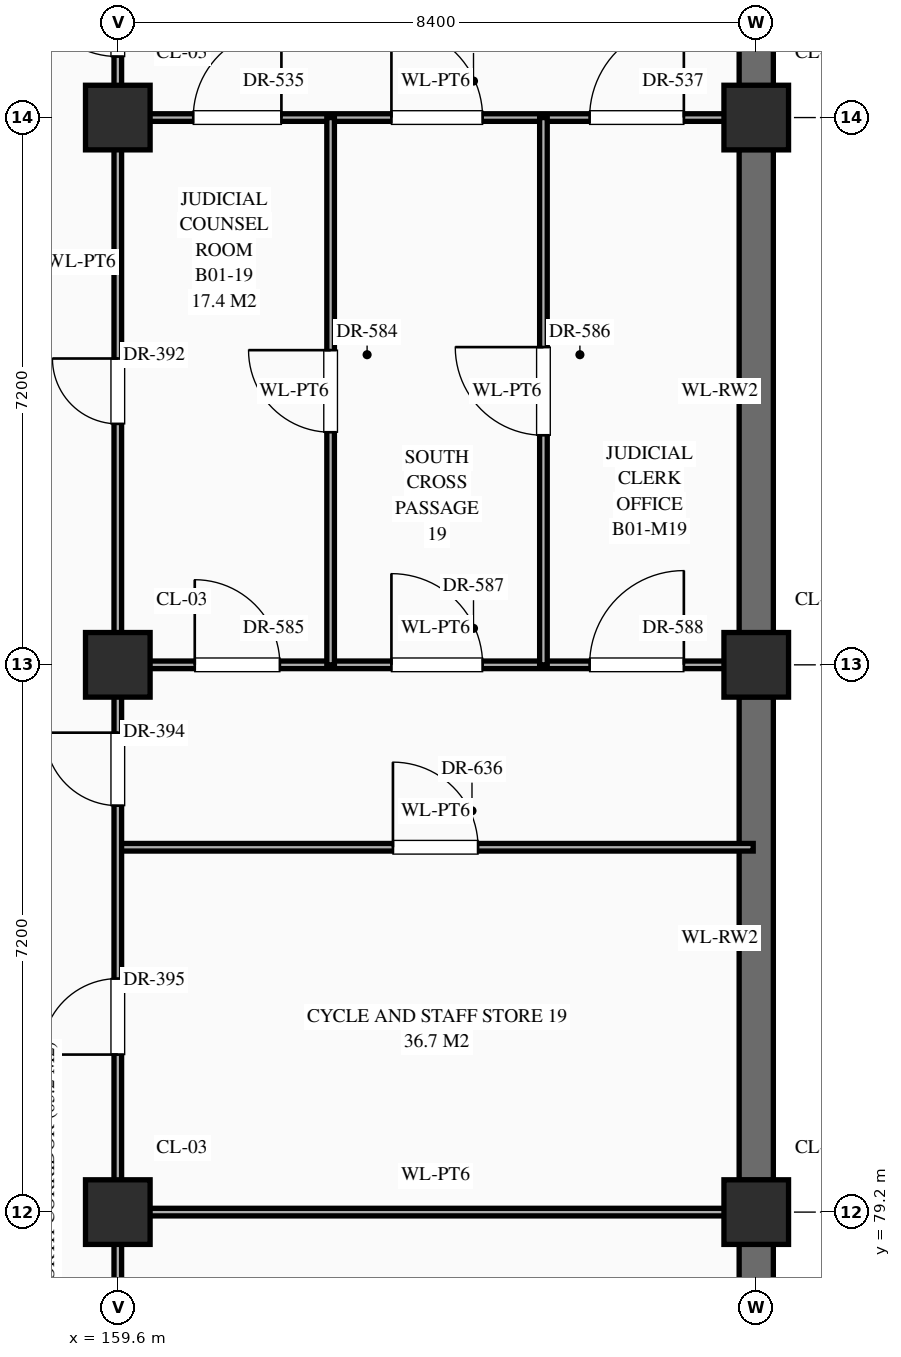
"""IFC4 building model, lengths in metres.
Left out: names, types, materials, properties, quantities, classifications, styles, units other than length and angle.
Written with IfcOpenShell. Run it as: python <this file> out.ifc"""

import sys

from ifc_helpers import new_model, si_unit, direction, frame, frame_2d, origin, origin_2d, place, context, subcontext, project, spatial, rectangle, extrude, element, fill, save


model = new_model("IFC4")
c1 = context("Model", 3, precision=1e-05, world=origin(), true_north=direction((0.0, 1.0)))
c2 = subcontext(c1, "Body", "Model", "MODEL_VIEW")
j1 = project(units=[si_unit("LENGTHUNIT", "METRE"), si_unit("PLANEANGLEUNIT", "RADIAN")], contexts=[c1])
p1 = place(None, origin())
s1 = spatial("IfcSite", under=j1, at=p1, CompositionType="ELEMENT")
p2 = place(p1, origin())
s2 = spatial("IfcBuilding", under=s1, at=p2, CompositionType="ELEMENT")
p3 = place(p2, frame((0.0, 0.0, -5.4)))
s3 = spatial("IfcBuildingStorey", under=s2, at=p3, CompositionType="ELEMENT", Elevation=-5.4)
for number, where, z_axis, x_axis in (
    (1, (159.6, 79.2, 0.0), (0.0, 0.0, 1.0), (1.0, 0.0, 0.0)),
    (2, (159.6, 86.4, 0.0), (0.0, 0.0, 1.0), (1.0, 0.0, 0.0)),
    (3, (159.6, 93.6, 0.0), (0.0, 0.0, 1.0), (1.0, 0.0, 0.0)),
    (4, (168.0, 79.2, 0.0), (0.0, 0.0, 1.0), (1.0, 0.0, 0.0)),
    (5, (168.0, 86.4, 0.0), (0.0, 0.0, 1.0), (1.0, 0.0, 0.0)),
    (6, (168.0, 93.6, 0.0), (0.0, 0.0, 1.0), (1.0, 0.0, 0.0)),
):
    element("IfcColumn", number, at=place(p3, frame(where, z_axis=z_axis, x_axis=x_axis)), inside=s3, PredefinedType="COLUMN", context=c2, shape_type="SweptSolid", body=[
        extrude(rectangle(XDim=0.85, YDim=0.85, at=origin_2d()), origin(), (0.0, 0.0, 1.0), 5.4),
    ])
p4 = place(p3, frame((168.0, 72.42, 0.0), z_axis=(0.0, 0.0, 1.0), x_axis=(0.0, 1.0, 0.0)))
e7 = element("IfcWall", 7, at=p4, inside=s3, PredefinedType="USERDEFINED", context=c2, shape_type="SweptSolid", body=[
    extrude(rectangle(XDim=6.36, YDim=0.45, at=frame_2d((3.18, 0.0))), origin(), (0.0, 0.0, 1.0), 5.1),
])
for number, where, z_axis, x_axis in (
    (8, (168.0, 79.62, 0.0), (0.0, 0.0, 1.0), (0.0, 1.0, 0.0)),
    (9, (168.0, 86.82, 0.0), (0.0, 0.0, 1.0), (0.0, 1.0, 0.0)),
    (10, (168.0, 94.02, 0.0), (0.0, 0.0, 1.0), (0.0, 1.0, 0.0)),
):
    element("IfcWall", number, at=place(p3, frame(where, z_axis=z_axis, x_axis=x_axis)), inside=s3, PredefinedType="USERDEFINED", context=c2, shape_type="SweptSolid", body=[
        extrude(rectangle(XDim=6.36, YDim=0.45, at=frame_2d((3.18, 0.0))), origin(), (0.0, 0.0, 1.0), 5.1),
    ])
p5 = place(p3, frame((159.6, 79.2, 0.0), z_axis=(0.0, 0.0, 1.0), x_axis=(1.0, 0.0, 0.0)))
e11 = element("IfcWall", 11, at=p5, inside=s3, PredefinedType="STANDARD", context=c2, shape_type="SweptSolid", body=[
    extrude(rectangle(XDim=8.36, YDim=0.1, at=frame_2d((4.18, 0.0))), origin(), (0.0, 0.0, 1.0), 4.25),
])
p6 = place(p3, frame((159.6, 84.0, 0.0), z_axis=(0.0, 0.0, 1.0), x_axis=(1.0, 0.0, 0.0)))
e12 = element("IfcWall", 12, at=p6, inside=s3, PredefinedType="STANDARD", context=c2, shape_type="SweptSolid", body=[
    extrude(rectangle(XDim=8.36, YDim=0.1, at=frame_2d((4.18, 0.0))), origin(), (0.0, 0.0, 1.0), 5.1),
])
p7 = place(p6, frame((3.62, 0.0, 0.0)))
e13 = element("IfcOpeningElement", 13, at=p7, cuts=e12, PredefinedType="OPENING", context=c2, shape_type="SweptSolid", body=[
    extrude(rectangle(XDim=1.12, YDim=2.25, at=frame_2d((0.56, 1.125))), frame((0.0, 0.062, 0.0), z_axis=(0.0, -1.0, 0.0), x_axis=(1.0, 0.0, 0.0)), (0.0, 0.0, 1.0), 0.124),
])
p8 = place(p3, frame((159.6, 86.4, 0.0), z_axis=(0.0, 0.0, 1.0), x_axis=(1.0, 0.0, 0.0)))
e14 = element("IfcWall", 14, at=p8, inside=s3, PredefinedType="STANDARD", context=c2, shape_type="SweptSolid", body=[
    extrude(rectangle(XDim=8.36, YDim=0.1, at=frame_2d((4.18, 0.0))), origin(), (0.0, 0.0, 1.0), 4.25),
])
p9 = place(p8, frame((1.012, 0.0, 0.0)))
e15 = element("IfcOpeningElement", 15, at=p9, cuts=e14, PredefinedType="OPENING", context=c2, shape_type="SweptSolid", body=[
    extrude(rectangle(XDim=1.12, YDim=2.25, at=frame_2d((0.56, 1.125))), frame((0.0, 0.062, 0.0), z_axis=(0.0, -1.0, 0.0), x_axis=(1.0, 0.0, 0.0)), (0.0, 0.0, 1.0), 0.124),
])
p10 = place(p8, frame((3.6, 0.0, 0.0)))
e16 = element("IfcOpeningElement", 16, at=p10, cuts=e14, PredefinedType="OPENING", context=c2, shape_type="SweptSolid", body=[
    extrude(rectangle(XDim=1.2, YDim=2.35, at=frame_2d((0.6, 1.175))), frame((0.0, 0.062, 0.0), z_axis=(0.0, -1.0, 0.0), x_axis=(1.0, 0.0, 0.0)), (0.0, 0.0, 1.0), 0.124),
])
p11 = place(p8, frame((6.208, 0.0, 0.0)))
e17 = element("IfcOpeningElement", 17, at=p11, cuts=e14, PredefinedType="OPENING", context=c2, shape_type="SweptSolid", body=[
    extrude(rectangle(XDim=1.24, YDim=2.3, at=frame_2d((0.62, 1.15))), frame((0.0, 0.062, 0.0), z_axis=(0.0, -1.0, 0.0), x_axis=(1.0, 0.0, 0.0)), (0.0, 0.0, 1.0), 0.124),
])
p12 = place(p3, frame((159.6, 93.6, 0.0), z_axis=(0.0, 0.0, 1.0), x_axis=(1.0, 0.0, 0.0)))
e18 = element("IfcWall", 18, at=p12, inside=s3, PredefinedType="STANDARD", context=c2, shape_type="SweptSolid", body=[
    extrude(rectangle(XDim=8.36, YDim=0.1, at=frame_2d((4.18, 0.0))), origin(), (0.0, 0.0, 1.0), 4.25),
])
p13 = place(p12, frame((0.992, 0.0, 0.0)))
e19 = element("IfcOpeningElement", 19, at=p13, cuts=e18, PredefinedType="OPENING", context=c2, shape_type="SweptSolid", body=[
    extrude(rectangle(XDim=1.16, YDim=2.3, at=frame_2d((0.58, 1.15))), frame((0.0, 0.062, 0.0), z_axis=(0.0, -1.0, 0.0), x_axis=(1.0, 0.0, 0.0)), (0.0, 0.0, 1.0), 0.124),
])
p14 = place(p12, frame((3.6, 0.0, 0.0)))
e20 = element("IfcOpeningElement", 20, at=p14, cuts=e18, PredefinedType="OPENING", context=c2, shape_type="SweptSolid", body=[
    extrude(rectangle(XDim=1.2, YDim=2.35, at=frame_2d((0.6, 1.175))), frame((0.0, 0.062, 0.0), z_axis=(0.0, -1.0, 0.0), x_axis=(1.0, 0.0, 0.0)), (0.0, 0.0, 1.0), 0.124),
])
p15 = place(p12, frame((6.208, 0.0, 0.0)))
e21 = element("IfcOpeningElement", 21, at=p15, cuts=e18, PredefinedType="OPENING", context=c2, shape_type="SweptSolid", body=[
    extrude(rectangle(XDim=1.24, YDim=2.3, at=frame_2d((0.62, 1.15))), frame((0.0, 0.062, 0.0), z_axis=(0.0, -1.0, 0.0), x_axis=(1.0, 0.0, 0.0)), (0.0, 0.0, 1.0), 0.124),
])
p16 = place(p3, frame((159.6, 43.2, 0.0), z_axis=(0.0, 0.0, 1.0), x_axis=(0.0, 1.0, 0.0)))
e22 = element("IfcWall", 22, at=p16, inside=s3, PredefinedType="STANDARD", context=c2, shape_type="SweptSolid", body=[
    extrude(rectangle(XDim=64.8, YDim=0.1, at=frame_2d((32.4, 0.0))), origin(), (0.0, 0.0, 1.0), 4.35),
])
p17 = place(p16, frame((58.462, 0.0, 0.0)))
e23 = element("IfcOpeningElement", 23, at=p17, cuts=e22, PredefinedType="OPENING", context=c2, shape_type="SweptSolid", body=[
    extrude(rectangle(XDim=1.02, YDim=2.4, at=frame_2d((0.51, 1.2))), frame((0.0, 0.062, 0.0), z_axis=(0.0, -1.0, 0.0), x_axis=(1.0, 0.0, 0.0)), (0.0, 0.0, 1.0), 0.124),
])
p18 = place(p16, frame((61.698, 0.0, 0.0)))
e24 = element("IfcOpeningElement", 24, at=p18, cuts=e22, PredefinedType="OPENING", context=c2, shape_type="SweptSolid", body=[
    extrude(rectangle(XDim=1.06, YDim=2.4, at=frame_2d((0.53, 1.2))), frame((0.0, 0.062, 0.0), z_axis=(0.0, -1.0, 0.0), x_axis=(1.0, 0.0, 0.0)), (0.0, 0.0, 1.0), 0.124),
])
p19 = place(p16, frame((51.202, 0.0, 0.0)))
e25 = element("IfcOpeningElement", 25, at=p19, cuts=e22, PredefinedType="OPENING", context=c2, shape_type="SweptSolid", body=[
    extrude(rectangle(XDim=1.14, YDim=2.4, at=frame_2d((0.57, 1.2))), frame((0.0, 0.062, 0.0), z_axis=(0.0, -1.0, 0.0), x_axis=(1.0, 0.0, 0.0)), (0.0, 0.0, 1.0), 0.124),
])
p20 = place(p16, frame((54.577, 0.0, 0.0)))
e26 = element("IfcOpeningElement", 26, at=p20, cuts=e22, PredefinedType="OPENING", context=c2, shape_type="SweptSolid", body=[
    extrude(rectangle(XDim=0.9, YDim=2.15, at=frame_2d((0.45, 1.075))), frame((0.0, 0.062, 0.0), z_axis=(0.0, -1.0, 0.0), x_axis=(1.0, 0.0, 0.0)), (0.0, 0.0, 1.0), 0.124),
])
p21 = place(p16, frame((46.37, 0.0, 0.0)))
e27 = element("IfcOpeningElement", 27, at=p21, cuts=e22, PredefinedType="OPENING", context=c2, shape_type="SweptSolid", body=[
    extrude(rectangle(XDim=0.86, YDim=2.1, at=frame_2d((0.43, 1.05))), frame((0.0, 0.062, 0.0), z_axis=(0.0, -1.0, 0.0), x_axis=(1.0, 0.0, 0.0)), (0.0, 0.0, 1.0), 0.124),
])
p22 = place(p16, frame((41.347, 0.0, 0.0)))
e28 = element("IfcOpeningElement", 28, at=p22, cuts=e22, PredefinedType="OPENING", context=c2, shape_type="SweptSolid", body=[
    extrude(rectangle(XDim=0.96, YDim=2.2, at=frame_2d((0.48, 1.1))), frame((0.0, 0.062, 0.0), z_axis=(0.0, -1.0, 0.0), x_axis=(1.0, 0.0, 0.0)), (0.0, 0.0, 1.0), 0.124),
])
p23 = place(p16, frame((38.073, 0.0, 0.0)))
e29 = element("IfcOpeningElement", 29, at=p23, cuts=e22, PredefinedType="OPENING", context=c2, shape_type="SweptSolid", body=[
    extrude(rectangle(XDim=1.0, YDim=2.25, at=frame_2d((0.5, 1.125))), frame((0.0, 0.062, 0.0), z_axis=(0.0, -1.0, 0.0), x_axis=(1.0, 0.0, 0.0)), (0.0, 0.0, 1.0), 0.124),
])
p24 = place(p16, frame((24.66, 0.0, 0.0)))
e30 = element("IfcOpeningElement", 30, at=p24, cuts=e22, PredefinedType="OPENING", context=c2, shape_type="SweptSolid", body=[
    extrude(rectangle(XDim=1.08, YDim=2.25, at=frame_2d((0.54, 1.125))), frame((0.0, 0.062, 0.0), z_axis=(0.0, -1.0, 0.0), x_axis=(1.0, 0.0, 0.0)), (0.0, 0.0, 1.0), 0.124),
])
p25 = place(p16, frame((10.16, 0.0, 0.0)))
e31 = element("IfcOpeningElement", 31, at=p25, cuts=e22, PredefinedType="OPENING", context=c2, shape_type="SweptSolid", body=[
    extrude(rectangle(XDim=1.28, YDim=2.35, at=frame_2d((0.64, 1.175))), frame((0.0, 0.062, 0.0), z_axis=(0.0, -1.0, 0.0), x_axis=(1.0, 0.0, 0.0)), (0.0, 0.0, 1.0), 0.124),
])
p26 = place(p3, frame((162.4, 86.4, 0.0), z_axis=(0.0, 0.0, 1.0), x_axis=(0.0, 1.0, 0.0)))
e32 = element("IfcWall", 32, at=p26, inside=s3, PredefinedType="STANDARD", context=c2, shape_type="SweptSolid", body=[
    extrude(rectangle(XDim=7.2, YDim=0.1, at=frame_2d((3.6, 0.0))), origin(), (0.0, 0.0, 1.0), 5.1),
])
p27 = place(p26, frame((3.06, 0.0, 0.0)))
e33 = element("IfcOpeningElement", 33, at=p27, cuts=e32, PredefinedType="OPENING", context=c2, shape_type="SweptSolid", body=[
    extrude(rectangle(XDim=1.08, YDim=2.25, at=frame_2d((0.54, 1.125))), frame((0.0, 0.062, 0.0), z_axis=(0.0, -1.0, 0.0), x_axis=(1.0, 0.0, 0.0)), (0.0, 0.0, 1.0), 0.124),
])
p28 = place(p3, frame((165.2, 86.4, 0.0), z_axis=(0.0, 0.0, 1.0), x_axis=(0.0, 1.0, 0.0)))
e34 = element("IfcWall", 34, at=p28, inside=s3, PredefinedType="STANDARD", context=c2, shape_type="SweptSolid", body=[
    extrude(rectangle(XDim=7.2, YDim=0.1, at=frame_2d((3.6, 0.0))), origin(), (0.0, 0.0, 1.0), 5.1),
])
p29 = place(p28, frame((3.02, 0.0, 0.0)))
e35 = element("IfcOpeningElement", 35, at=p29, cuts=e34, PredefinedType="OPENING", context=c2, shape_type="SweptSolid", body=[
    extrude(rectangle(XDim=1.16, YDim=2.3, at=frame_2d((0.58, 1.15))), frame((0.0, 0.062, 0.0), z_axis=(0.0, -1.0, 0.0), x_axis=(1.0, 0.0, 0.0)), (0.0, 0.0, 1.0), 0.124),
])
p30 = place(p19, origin())
e36 = element("IfcDoor", 36, at=p30, inside=s3, OperationType="SINGLE_SWING_RIGHT", PredefinedType="DOOR", context=c2, shape_type="SweptSolid", body=[
    extrude(rectangle(XDim=1.14, YDim=2.4, at=frame_2d((0.57, 1.2))), frame((0.0, 0.025, 0.0), z_axis=(0.0, -1.0, 0.0), x_axis=(1.0, 0.0, 0.0)), (0.0, 0.0, 1.0), 0.05),
])
fill(e25, e36)
p31 = place(p21, origin())
e37 = element("IfcDoor", 37, at=p31, inside=s3, OperationType="SINGLE_SWING_RIGHT", PredefinedType="DOOR", context=c2, shape_type="SweptSolid", body=[
    extrude(rectangle(XDim=0.86, YDim=2.1, at=frame_2d((0.43, 1.05))), frame((0.0, 0.025, 0.0), z_axis=(0.0, -1.0, 0.0), x_axis=(1.0, 0.0, 0.0)), (0.0, 0.0, 1.0), 0.05),
])
fill(e27, e37)
p32 = place(p22, origin())
e38 = element("IfcDoor", 38, at=p32, inside=s3, OperationType="SINGLE_SWING_RIGHT", PredefinedType="DOOR", context=c2, shape_type="SweptSolid", body=[
    extrude(rectangle(XDim=0.96, YDim=2.2, at=frame_2d((0.48, 1.1))), frame((0.0, 0.025, 0.0), z_axis=(0.0, -1.0, 0.0), x_axis=(1.0, 0.0, 0.0)), (0.0, 0.0, 1.0), 0.05),
])
fill(e28, e38)
p33 = place(p23, origin())
e39 = element("IfcDoor", 39, at=p33, inside=s3, OperationType="SINGLE_SWING_LEFT", PredefinedType="DOOR", context=c2, shape_type="SweptSolid", body=[
    extrude(rectangle(XDim=1.0, YDim=2.25, at=frame_2d((0.5, 1.125))), frame((0.0, 0.025, 0.0), z_axis=(0.0, -1.0, 0.0), x_axis=(1.0, 0.0, 0.0)), (0.0, 0.0, 1.0), 0.05),
])
fill(e29, e39)
p34 = place(p13, origin())
e40 = element("IfcDoor", 40, at=p34, inside=s3, OperationType="SINGLE_SWING_RIGHT", PredefinedType="DOOR", context=c2, shape_type="SweptSolid", body=[
    extrude(rectangle(XDim=1.16, YDim=2.3, at=frame_2d((0.58, 1.15))), frame((0.0, 0.025, 0.0), z_axis=(0.0, -1.0, 0.0), x_axis=(1.0, 0.0, 0.0)), (0.0, 0.0, 1.0), 0.05),
])
fill(e19, e40)
p35 = place(p14, origin())
e41 = element("IfcDoor", 41, at=p35, inside=s3, OperationType="SINGLE_SWING_LEFT", PredefinedType="DOOR", context=c2, shape_type="SweptSolid", body=[
    extrude(rectangle(XDim=1.2, YDim=2.35, at=frame_2d((0.6, 1.175))), frame((0.0, 0.025, 0.0), z_axis=(0.0, -1.0, 0.0), x_axis=(1.0, 0.0, 0.0)), (0.0, 0.0, 1.0), 0.05),
])
fill(e20, e41)
p36 = place(p15, origin())
e42 = element("IfcDoor", 42, at=p36, inside=s3, OperationType="SINGLE_SWING_RIGHT", PredefinedType="DOOR", context=c2, shape_type="SweptSolid", body=[
    extrude(rectangle(XDim=1.24, YDim=2.3, at=frame_2d((0.62, 1.15))), frame((0.0, 0.025, 0.0), z_axis=(0.0, -1.0, 0.0), x_axis=(1.0, 0.0, 0.0)), (0.0, 0.0, 1.0), 0.05),
])
fill(e21, e42)
p37 = place(p27, origin())
e43 = element("IfcDoor", 43, at=p37, inside=s3, OperationType="SINGLE_SWING_RIGHT", PredefinedType="DOOR", context=c2, shape_type="SweptSolid", body=[
    extrude(rectangle(XDim=1.08, YDim=2.25, at=frame_2d((0.54, 1.125))), frame((0.0, 0.025, 0.0), z_axis=(0.0, -1.0, 0.0), x_axis=(1.0, 0.0, 0.0)), (0.0, 0.0, 1.0), 0.05),
])
fill(e33, e43)
p38 = place(p9, origin())
e44 = element("IfcDoor", 44, at=p38, inside=s3, OperationType="SINGLE_SWING_LEFT", PredefinedType="DOOR", context=c2, shape_type="SweptSolid", body=[
    extrude(rectangle(XDim=1.12, YDim=2.25, at=frame_2d((0.56, 1.125))), frame((0.0, 0.025, 0.0), z_axis=(0.0, -1.0, 0.0), x_axis=(1.0, 0.0, 0.0)), (0.0, 0.0, 1.0), 0.05),
])
fill(e15, e44)
p39 = place(p29, origin())
e45 = element("IfcDoor", 45, at=p39, inside=s3, OperationType="SINGLE_SWING_RIGHT", PredefinedType="DOOR", context=c2, shape_type="SweptSolid", body=[
    extrude(rectangle(XDim=1.16, YDim=2.3, at=frame_2d((0.58, 1.15))), frame((0.0, 0.025, 0.0), z_axis=(0.0, -1.0, 0.0), x_axis=(1.0, 0.0, 0.0)), (0.0, 0.0, 1.0), 0.05),
])
fill(e35, e45)
p40 = place(p10, origin())
e46 = element("IfcDoor", 46, at=p40, inside=s3, OperationType="SINGLE_SWING_LEFT", PredefinedType="DOOR", context=c2, shape_type="SweptSolid", body=[
    extrude(rectangle(XDim=1.2, YDim=2.35, at=frame_2d((0.6, 1.175))), frame((0.0, 0.025, 0.0), z_axis=(0.0, -1.0, 0.0), x_axis=(1.0, 0.0, 0.0)), (0.0, 0.0, 1.0), 0.05),
])
fill(e16, e46)
p41 = place(p11, origin())
e47 = element("IfcDoor", 47, at=p41, inside=s3, OperationType="SINGLE_SWING_RIGHT", PredefinedType="DOOR", context=c2, shape_type="SweptSolid", body=[
    extrude(rectangle(XDim=1.24, YDim=2.3, at=frame_2d((0.62, 1.15))), frame((0.0, 0.025, 0.0), z_axis=(0.0, -1.0, 0.0), x_axis=(1.0, 0.0, 0.0)), (0.0, 0.0, 1.0), 0.05),
])
fill(e17, e47)
p42 = place(p7, origin())
e48 = element("IfcDoor", 48, at=p42, inside=s3, OperationType="SINGLE_SWING_LEFT", PredefinedType="DOOR", context=c2, shape_type="SweptSolid", body=[
    extrude(rectangle(XDim=1.12, YDim=2.25, at=frame_2d((0.56, 1.125))), frame((0.0, 0.025, 0.0), z_axis=(0.0, -1.0, 0.0), x_axis=(1.0, 0.0, 0.0)), (0.0, 0.0, 1.0), 0.05),
])
fill(e13, e48)
save(model, sys.argv[1])
